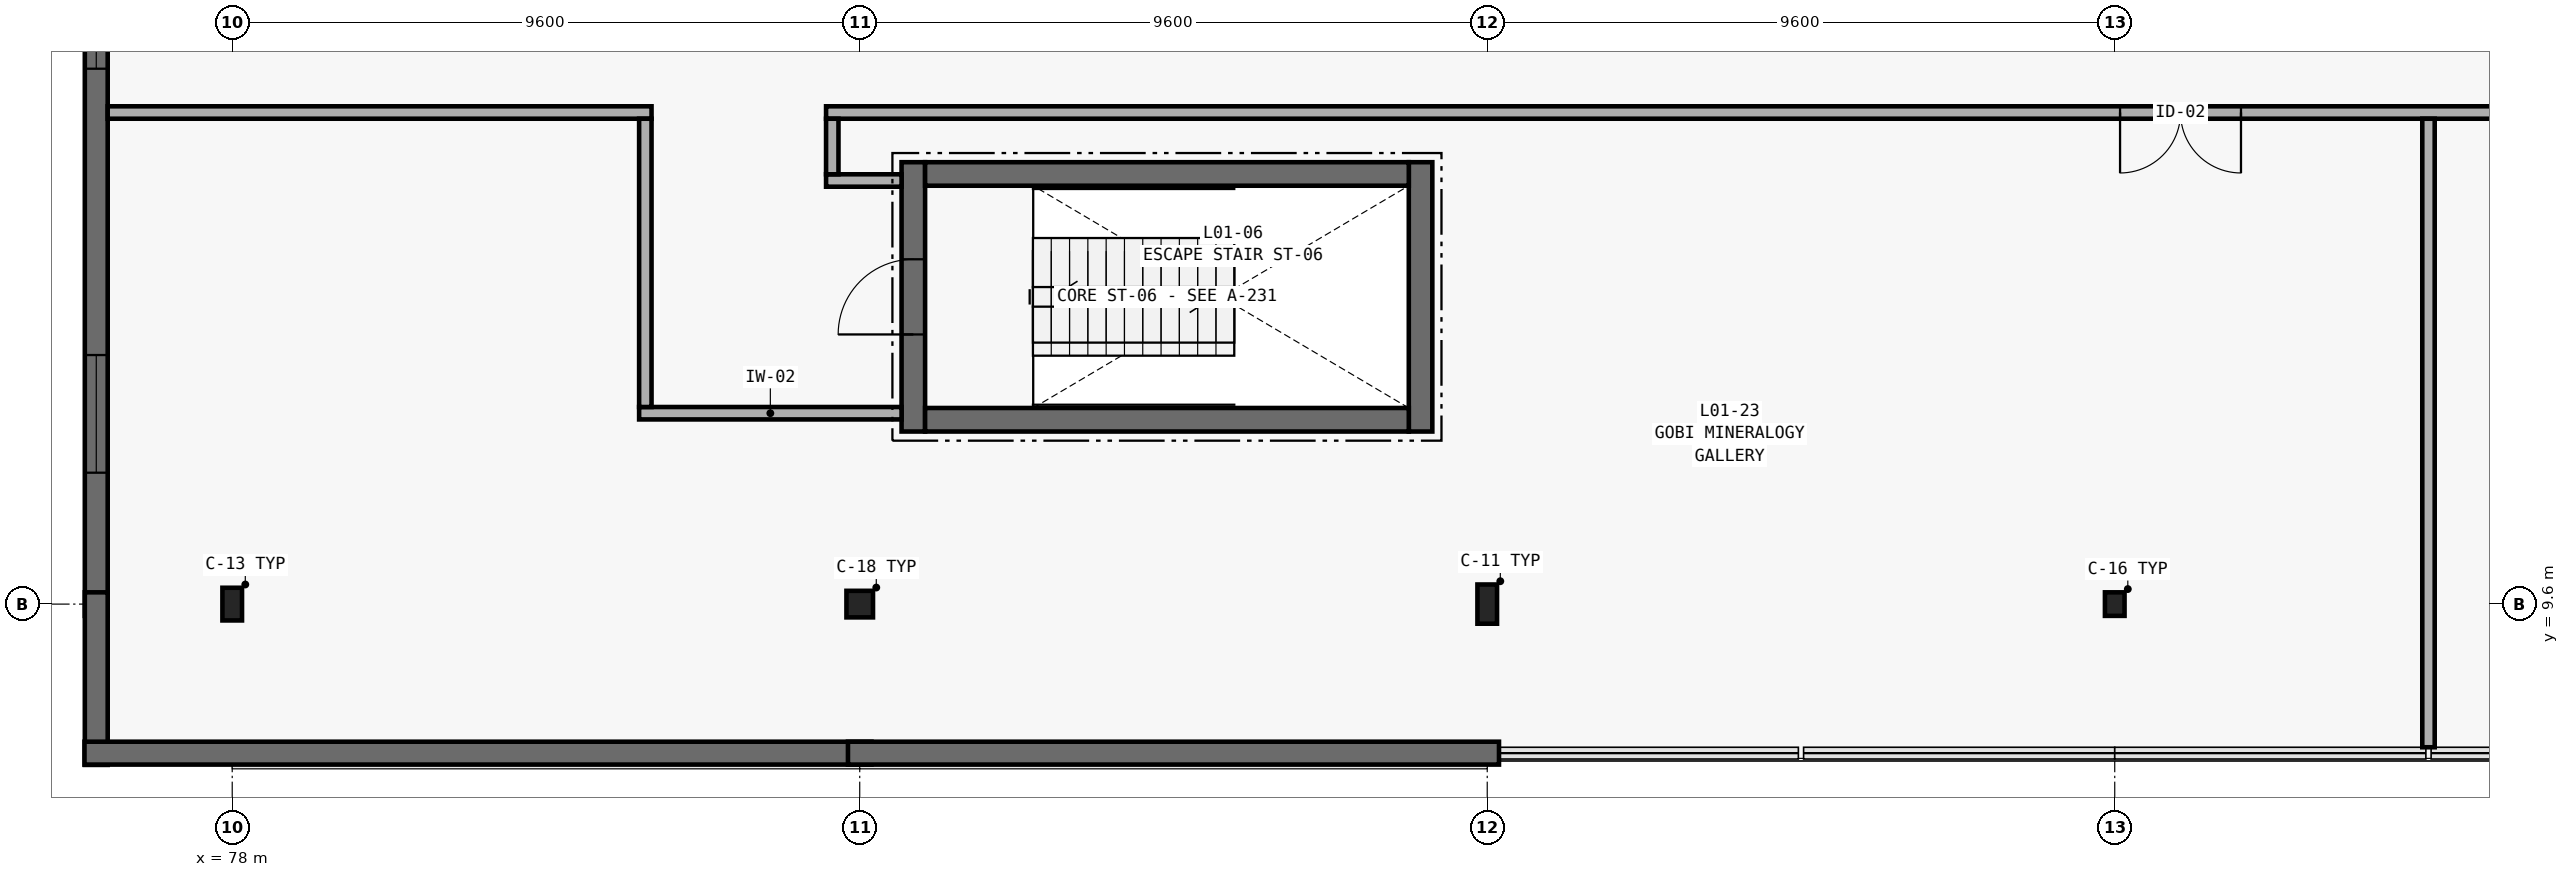
"""IFC4 building model, lengths in metres.
Left out: names, types, materials, properties, quantities, classifications, styles, units other than length and angle.
Written with IfcOpenShell. Run it as: python <this file> out.ifc"""

import sys

from ifc_helpers import new_model, si_unit, direction, frame, frame_2d, origin, origin_2d, place, context, subcontext, project, spatial, rectangle, hollow_circle, i_section, extrude, element, fill, save


model = new_model("IFC4")
c1 = context("Model", 3, precision=1e-05, world=origin(), true_north=direction((0.0, 1.0)))
c2 = subcontext(c1, "Body", "Model", "MODEL_VIEW")
j1 = project(units=[si_unit("LENGTHUNIT", "METRE"), si_unit("PLANEANGLEUNIT", "RADIAN")], contexts=[c1])
p1 = place(None, origin())
s1 = spatial("IfcSite", under=j1, at=p1, CompositionType="ELEMENT")
p2 = place(p1, origin())
s2 = spatial("IfcBuilding", under=s1, at=p2, CompositionType="ELEMENT")
p3 = place(p2, frame((0.0, 0.0, 4.8)))
s3 = spatial("IfcBuildingStorey", under=s2, at=p3, CompositionType="ELEMENT", Elevation=4.8)
p4 = place(p3, frame((78.0, 9.6, 0.0), z_axis=(0.0, 0.0, 1.0), x_axis=(1.0, 0.0, 0.0)))
e1 = element("IfcColumn", 1, at=p4, inside=s3, PredefinedType="COLUMN", context=c2, shape_type="SweptSolid", body=[
    extrude(i_section(OverallWidth=0.3, OverallDepth=0.5, WebThickness=0.014, FlangeThickness=0.028, FilletRadius=0.027, at=origin_2d()), origin(), (0.0, 0.0, 1.0), 4.2),
])
p5 = place(p3, frame((87.6, 9.6, 0.0), z_axis=(0.0, 0.0, 1.0), x_axis=(1.0, 0.0, 0.0)))
e2 = element("IfcColumn", 2, at=p5, inside=s3, PredefinedType="COLUMN", context=c2, shape_type="SweptSolid", body=[
    extrude(hollow_circle(Radius=0.203, WallThickness=0.02, at=origin_2d()), origin(), (0.0, 0.0, 1.0), 4.2),
])
p6 = place(p3, frame((97.2, 9.6, 0.0), z_axis=(0.0, 0.0, 1.0), x_axis=(1.0, 0.0, 0.0)))
e3 = element("IfcColumn", 3, at=p6, inside=s3, PredefinedType="COLUMN", context=c2, shape_type="SweptSolid", body=[
    extrude(i_section(OverallWidth=0.3, OverallDepth=0.6, WebThickness=0.015, FlangeThickness=0.03, FilletRadius=0.027, at=origin_2d()), origin(), (0.0, 0.0, 1.0), 4.2),
])
p7 = place(p3, frame((106.8, 9.6, 0.0), z_axis=(0.0, 0.0, 1.0), x_axis=(1.0, 0.0, 0.0)))
e4 = element("IfcColumn", 4, at=p7, inside=s3, PredefinedType="COLUMN", context=c2, shape_type="SweptSolid", body=[
    extrude(i_section(OverallWidth=0.3, OverallDepth=0.36, WebThickness=0.012, FlangeThickness=0.022, FilletRadius=0.027, at=origin_2d()), origin(), (0.0, 0.0, 1.0), 4.2),
])
p8 = place(p3, frame((75.92, 21.78, 0.0), z_axis=(0.0, 0.0, 1.0), x_axis=(0.0, -1.0, 0.0)))
e5 = element("IfcWall", 5, at=p8, inside=s3, PredefinedType="STANDARD", context=c2, shape_type="SweptSolid", body=[
    extrude(rectangle(XDim=12.36, YDim=0.35, at=frame_2d((6.18, 0.0))), origin(), (0.0, 0.0, 1.0), 3.9),
])
p9 = place(p8, frame((2.19, 0.0, 1.8)))
e6 = element("IfcOpeningElement", 6, at=p9, cuts=e5, PredefinedType="OPENING", context=c2, shape_type="SweptSolid", body=[
    extrude(rectangle(XDim=1.8, YDim=1.1, at=frame_2d((0.9, 0.55))), frame((0.0, 0.19, 0.0), z_axis=(0.0, -1.0, 0.0), x_axis=(1.0, 0.0, 0.0)), (0.0, 0.0, 1.0), 0.38),
])
p10 = place(p8, frame((8.37, 0.0, 1.8)))
e7 = element("IfcOpeningElement", 7, at=p10, cuts=e5, PredefinedType="OPENING", context=c2, shape_type="SweptSolid", body=[
    extrude(rectangle(XDim=1.8, YDim=1.1, at=frame_2d((0.9, 0.55))), frame((0.0, 0.19, 0.0), z_axis=(0.0, -1.0, 0.0), x_axis=(1.0, 0.0, 0.0)), (0.0, 0.0, 1.0), 0.38),
])
p11 = place(p3, frame((75.92, 9.78, 0.0), z_axis=(0.0, 0.0, 1.0), x_axis=(0.0, -1.0, 0.0)))
e8 = element("IfcWall", 8, at=p11, inside=s3, PredefinedType="STANDARD", context=c2, shape_type="SweptSolid", body=[
    extrude(rectangle(XDim=2.64, YDim=0.35, at=frame_2d((1.32, 0.0))), origin(), (0.0, 0.0, 1.0), 3.9),
])
p12 = place(p3, frame((75.74, 7.32, 0.0), z_axis=(0.0, 0.0, 1.0), x_axis=(1.0, 0.0, 0.0)))
e9 = element("IfcWall", 9, at=p12, inside=s3, PredefinedType="STANDARD", context=c2, shape_type="SweptSolid", body=[
    extrude(rectangle(XDim=12.04, YDim=0.35, at=frame_2d((6.02, 0.0))), origin(), (0.0, 0.0, 1.0), 3.9),
])
p13 = place(p3, frame((87.42, 7.32, 0.0), z_axis=(0.0, 0.0, 1.0), x_axis=(1.0, 0.0, 0.0)))
e10 = element("IfcWall", 10, at=p13, inside=s3, PredefinedType="STANDARD", context=c2, shape_type="SweptSolid", body=[
    extrude(rectangle(XDim=9.96, YDim=0.35, at=frame_2d((4.98, 0.0))), origin(), (0.0, 0.0, 1.0), 3.9),
])
p14 = place(p3, frame((88.42, 12.24, 0.0), z_axis=(0.0, 0.0, 1.0), x_axis=(0.0, 1.0, 0.0)))
e11 = element("IfcWall", 11, at=p14, inside=s3, PredefinedType="SHEAR", context=c2, shape_type="SweptSolid", body=[
    extrude(rectangle(XDim=4.12, YDim=0.36, at=frame_2d((2.06, 0.0))), origin(), (0.0, 0.0, 1.0), 3.88),
])
p15 = place(p14, frame((1.485, 0.0, 0.0)))
e12 = element("IfcOpeningElement", 12, at=p15, cuts=e11, PredefinedType="OPENING", context=c2, shape_type="SweptSolid", body=[
    extrude(rectangle(XDim=1.15, YDim=2.15, at=frame_2d((0.575, 1.075))), frame((0.0, 0.195, 0.0), z_axis=(0.0, -1.0, 0.0), x_axis=(1.0, 0.0, 0.0)), (0.0, 0.0, 1.0), 0.39),
])
p16 = place(p3, frame((96.18, 12.24, 0.0), z_axis=(0.0, 0.0, 1.0), x_axis=(0.0, 1.0, 0.0)))
e13 = element("IfcWall", 13, at=p16, inside=s3, PredefinedType="SHEAR", context=c2, shape_type="SweptSolid", body=[
    extrude(rectangle(XDim=4.12, YDim=0.36, at=frame_2d((2.06, 0.0))), origin(), (0.0, 0.0, 1.0), 3.88),
])
for number, where, z_axis, x_axis in (
    (14, (88.6, 16.18, 0.0), (0.0, 0.0, 1.0), (1.0, 0.0, 0.0)),
    (15, (88.6, 12.42, 0.0), (0.0, 0.0, 1.0), (1.0, 0.0, 0.0)),
):
    element("IfcWall", number, at=place(p3, frame(where, z_axis=z_axis, x_axis=x_axis)), inside=s3, PredefinedType="SHEAR", context=c2, shape_type="SweptSolid", body=[
        extrude(rectangle(XDim=7.4, YDim=0.36, at=frame_2d((3.7, 0.0))), origin(), (0.0, 0.0, 1.0), 3.88),
    ])
p17 = place(p3, frame((84.225, 12.52, 0.0), z_axis=(0.0, 0.0, 1.0), x_axis=(1.0, 0.0, 0.0)))
e16 = element("IfcWall", 16, at=p17, inside=s3, PredefinedType="PARTITIONING", context=c2, shape_type="SweptSolid", body=[
    extrude(rectangle(XDim=4.015, YDim=0.19, at=frame_2d((2.007, 0.0))), origin(), (0.0, 0.0, 1.0), 2.76),
])
p18 = place(p3, frame((87.085, 16.08, 0.0), z_axis=(0.0, 0.0, 1.0), x_axis=(1.0, 0.0, 0.0)))
e17 = element("IfcWall", 17, at=p18, inside=s3, PredefinedType="PARTITIONING", context=c2, shape_type="SweptSolid", body=[
    extrude(rectangle(XDim=1.155, YDim=0.19, at=frame_2d((0.578, 0.0))), origin(), (0.0, 0.0, 1.0), 2.76),
])
p19 = place(p3, frame((76.095, 17.12, 0.0), z_axis=(0.0, 0.0, 1.0), x_axis=(1.0, 0.0, 0.0)))
e18 = element("IfcWall", 18, at=p19, inside=s3, PredefinedType="PARTITIONING", context=c2, shape_type="SweptSolid", body=[
    extrude(rectangle(XDim=8.32, YDim=0.19, at=frame_2d((4.16, 0.0))), origin(), (0.0, 0.0, 1.0), 2.76),
])
p20 = place(p3, frame((87.085, 17.12, 0.0), z_axis=(0.0, 0.0, 1.0), x_axis=(1.0, 0.0, 0.0)))
e19 = element("IfcWall", 19, at=p20, inside=s3, PredefinedType="PARTITIONING", context=c2, shape_type="SweptSolid", body=[
    extrude(rectangle(XDim=54.53, YDim=0.19, at=frame_2d((27.265, 0.0))), origin(), (0.0, 0.0, 1.0), 2.76),
])
p21 = place(p20, frame((19.796, 0.0, 0.0)))
e20 = element("IfcOpeningElement", 20, at=p21, cuts=e19, PredefinedType="OPENING", context=c2, shape_type="SweptSolid", body=[
    extrude(rectangle(XDim=1.85, YDim=2.35, at=frame_2d((0.925, 1.175))), frame((0.0, 0.11, 0.0), z_axis=(0.0, -1.0, 0.0), x_axis=(1.0, 0.0, 0.0)), (0.0, 0.0, 1.0), 0.22),
])
p22 = place(p20, frame((26.34, 0.0, 0.0)))
e21 = element("IfcOpeningElement", 21, at=p22, cuts=e19, PredefinedType="OPENING", context=c2, shape_type="SweptSolid", body=[
    extrude(rectangle(XDim=1.85, YDim=2.35, at=frame_2d((0.925, 1.175))), frame((0.0, 0.11, 0.0), z_axis=(0.0, -1.0, 0.0), x_axis=(1.0, 0.0, 0.0)), (0.0, 0.0, 1.0), 0.22),
])
p23 = place(p3, frame((84.32, 12.615, 0.0), z_axis=(0.0, 0.0, 1.0), x_axis=(0.0, 1.0, 0.0)))
e22 = element("IfcWall", 22, at=p23, inside=s3, PredefinedType="PARTITIONING", context=c2, shape_type="SweptSolid", body=[
    extrude(rectangle(XDim=4.41, YDim=0.19, at=frame_2d((2.205, 0.0))), origin(), (0.0, 0.0, 1.0), 2.76),
])
p24 = place(p3, frame((87.18, 16.175, 0.0), z_axis=(0.0, 0.0, 1.0), x_axis=(0.0, 1.0, 0.0)))
e23 = element("IfcWall", 23, at=p24, inside=s3, PredefinedType="PARTITIONING", context=c2, shape_type="SweptSolid", body=[
    extrude(rectangle(XDim=0.85, YDim=0.19, at=frame_2d((0.425, 0.0))), origin(), (0.0, 0.0, 1.0), 2.76),
])
p25 = place(p3, frame((111.6, 7.41, 0.0), z_axis=(0.0, 0.0, 1.0), x_axis=(0.0, 1.0, 0.0)))
e24 = element("IfcWall", 24, at=p25, inside=s3, PredefinedType="PARTITIONING", context=c2, shape_type="SweptSolid", body=[
    extrude(rectangle(XDim=9.615, YDim=0.19, at=frame_2d((4.808, 0.0))), origin(), (0.0, 0.0, 1.0), 2.76),
])
p26 = place(p9, origin())
e25 = element("IfcWindow", 25, at=p26, inside=s3, PartitioningType="SINGLE_PANEL", PredefinedType="WINDOW", context=c2, shape_type="SweptSolid", body=[
    extrude(rectangle(XDim=1.8, YDim=1.1, at=frame_2d((0.9, 0.55))), frame((0.0, 0.03, 0.0), z_axis=(0.0, -1.0, 0.0), x_axis=(1.0, 0.0, 0.0)), (0.0, 0.0, 1.0), 0.06),
])
fill(e6, e25)
p27 = place(p10, origin())
e26 = element("IfcWindow", 26, at=p27, inside=s3, PartitioningType="SINGLE_PANEL", PredefinedType="WINDOW", context=c2, shape_type="SweptSolid", body=[
    extrude(rectangle(XDim=1.8, YDim=1.1, at=frame_2d((0.9, 0.55))), frame((0.0, 0.03, 0.0), z_axis=(0.0, -1.0, 0.0), x_axis=(1.0, 0.0, 0.0)), (0.0, 0.0, 1.0), 0.06),
])
fill(e7, e26)
p28 = place(p15, origin())
e27 = element("IfcDoor", 27, at=p28, inside=s3, OperationType="SINGLE_SWING_LEFT", PredefinedType="DOOR", context=c2, shape_type="SweptSolid", body=[
    extrude(rectangle(XDim=1.15, YDim=2.15, at=frame_2d((0.575, 1.075))), frame((0.0, 0.025, 0.0), z_axis=(0.0, -1.0, 0.0), x_axis=(1.0, 0.0, 0.0)), (0.0, 0.0, 1.0), 0.05),
])
fill(e12, e27)
p29 = place(p21, frame((1.85, 0.0, 0.0), z_axis=(0.0, 0.0, 1.0), x_axis=(-1.0, 0.0, 0.0)))
e28 = element("IfcDoor", 28, at=p29, inside=s3, OperationType="DOUBLE_DOOR_SINGLE_SWING", PredefinedType="DOOR", context=c2, shape_type="SweptSolid", body=[
    extrude(rectangle(XDim=1.85, YDim=2.35, at=frame_2d((0.925, 1.175))), frame((0.0, 0.025, 0.0), z_axis=(0.0, -1.0, 0.0), x_axis=(1.0, 0.0, 0.0)), (0.0, 0.0, 1.0), 0.05),
])
fill(e20, e28)
save(model, sys.argv[1])
